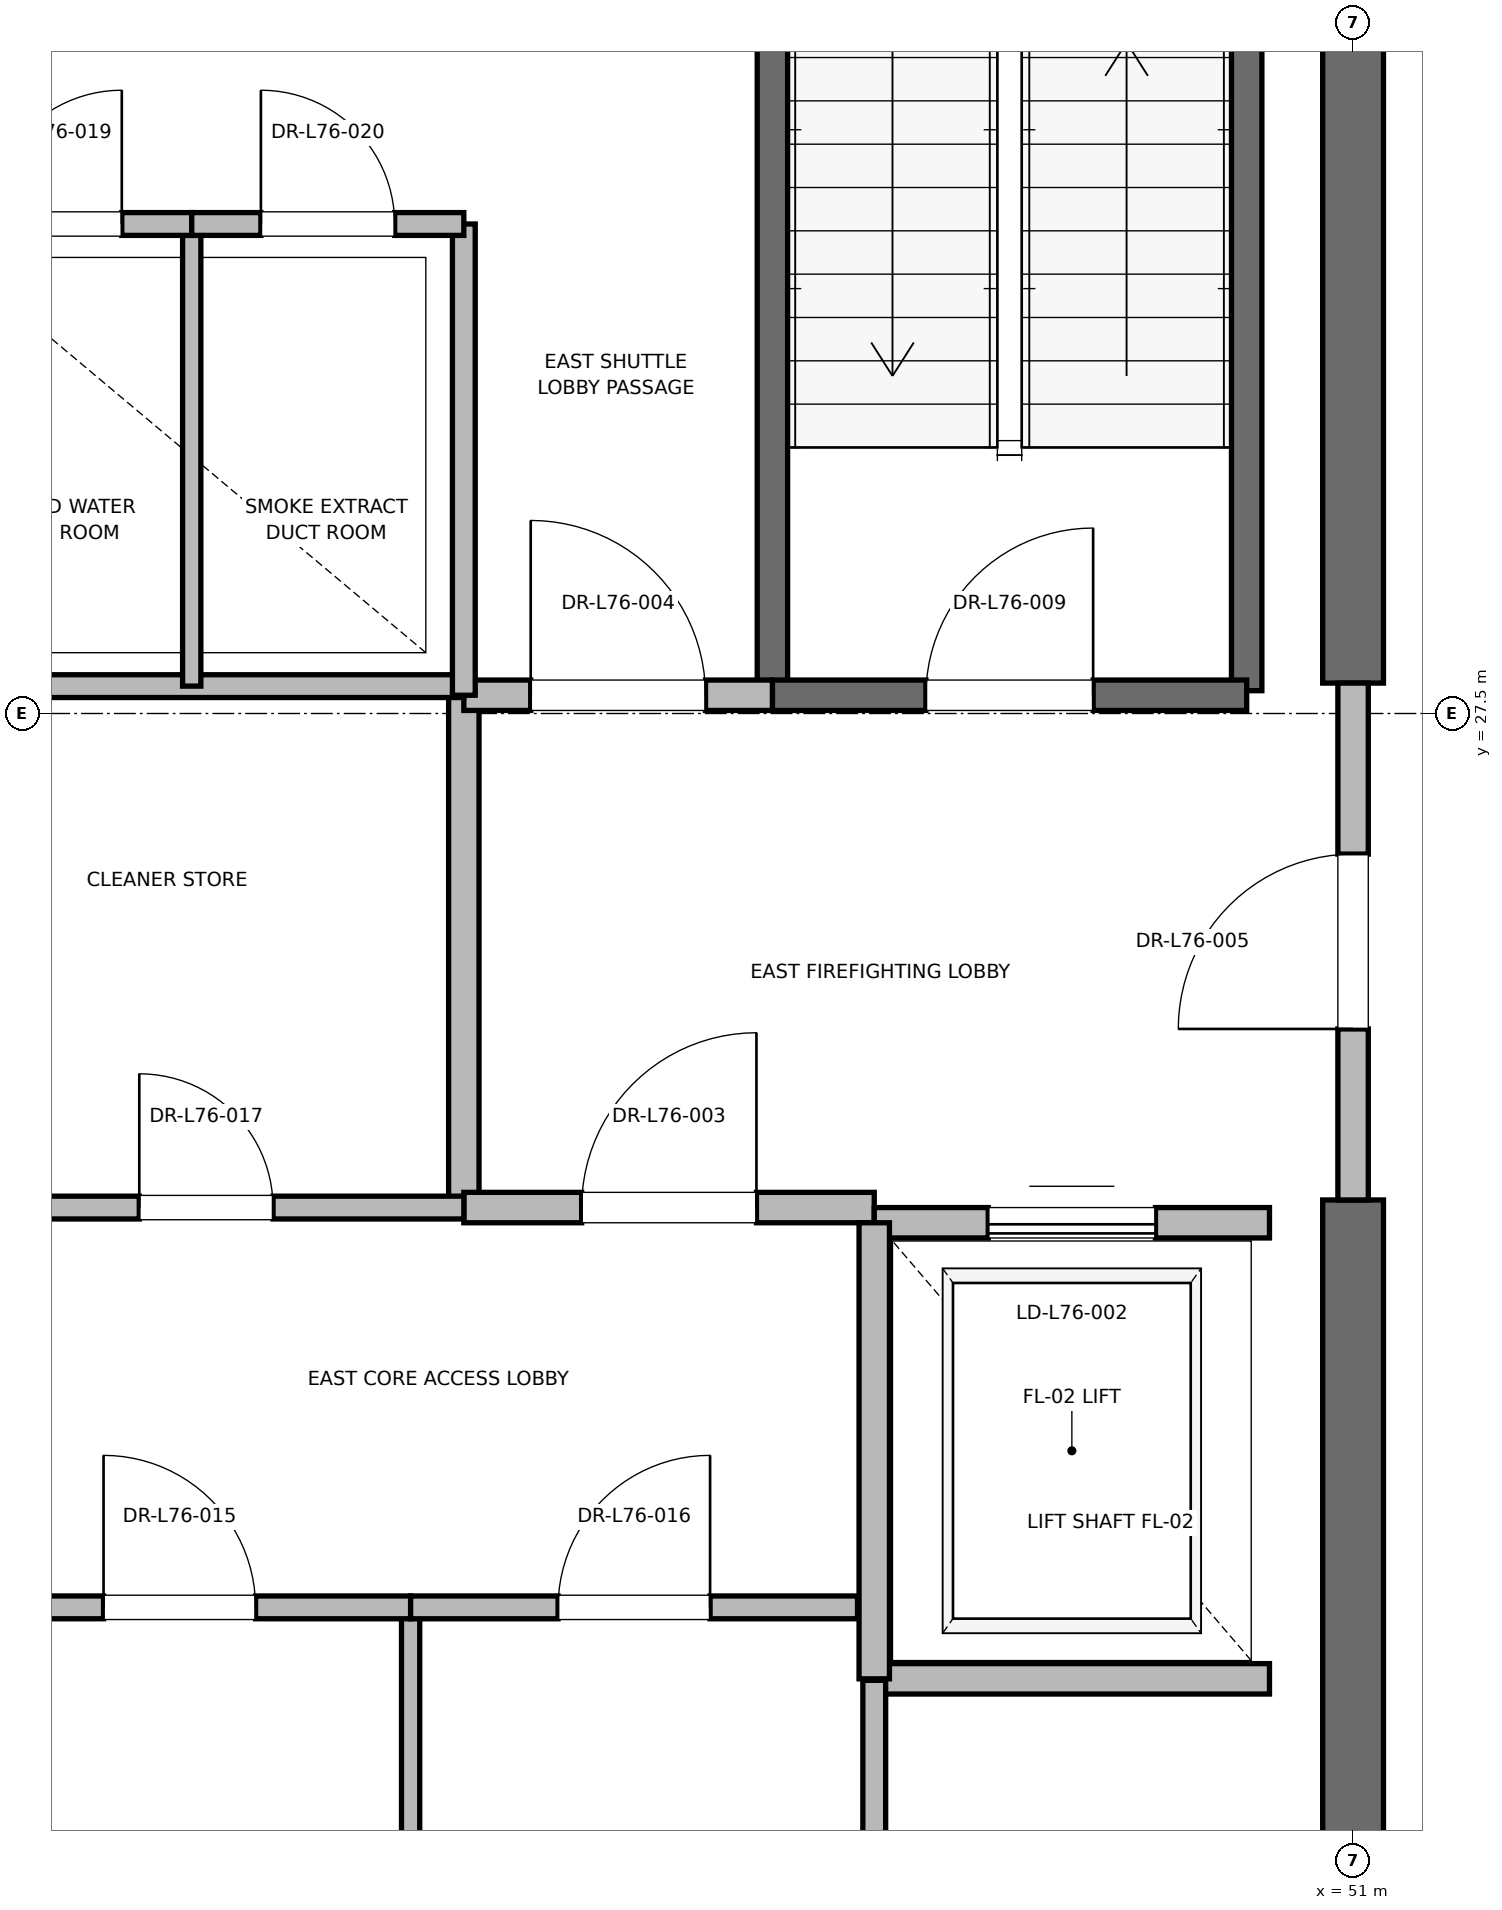
"""IFC4 building model, lengths in metres.
Left out: names, types, materials, properties, quantities, classifications, styles, units other than length and angle.
Written with IfcOpenShell. Run it as: python <this file> out.ifc"""

import sys

from ifc_helpers import new_model, si_unit, direction, frame, frame_2d, origin, place, context, subcontext, project, spatial, rectangle, extrude, element, fill, save


model = new_model("IFC4")
c1 = context("Model", 3, precision=1e-05, world=origin(), true_north=direction((0.0, 1.0)))
c2 = subcontext(c1, "Body", "Model", "MODEL_VIEW")
j1 = project(units=[si_unit("LENGTHUNIT", "METRE"), si_unit("PLANEANGLEUNIT", "RADIAN")], contexts=[c1])
p1 = place(None, origin())
s1 = spatial("IfcSite", under=j1, at=p1, CompositionType="ELEMENT")
p2 = place(p1, origin())
s2 = spatial("IfcBuilding", under=s1, at=p2, CompositionType="ELEMENT")
p3 = place(p2, frame((0.0, 0.0, 326.8)))
s3 = spatial("IfcBuildingStorey", under=s2, at=p3, CompositionType="ELEMENT", Elevation=326.8)
p4 = place(p3, frame((51.0, 18.5, 0.0), z_axis=(0.0, 0.0, 1.0), x_axis=(0.0, 1.0, 0.0)))
e1 = element("IfcWall", 1, at=p4, inside=s3, PredefinedType="SHEAR", context=c2, shape_type="SweptSolid", body=[
    extrude(rectangle(XDim=5.8, YDim=0.4, at=frame_2d((2.9, 0.0))), origin(), (0.0, 0.0, 1.0), 3.785),
])
p5 = place(p3, frame((51.0, 27.7, 0.0), z_axis=(0.0, 0.0, 1.0), x_axis=(0.0, 1.0, 0.0)))
e2 = element("IfcWall", 2, at=p5, inside=s3, PredefinedType="SHEAR", context=c2, shape_type="SweptSolid", body=[
    extrude(rectangle(XDim=8.8, YDim=0.4, at=frame_2d((4.4, 0.0))), origin(), (0.0, 0.0, 1.0), 3.785),
])
p6 = place(p3, frame((50.3, 27.65, 0.0), z_axis=(0.0, 0.0, 1.0), x_axis=(0.0, 1.0, 0.0)))
e3 = element("IfcWall", 3, at=p6, inside=s3, PredefinedType="SOLIDWALL", context=c2, shape_type="SweptSolid", body=[
    extrude(rectangle(XDim=8.15, YDim=0.2, at=frame_2d((4.075, 0.0))), origin(), (0.0, 0.0, 1.0), 3.785),
])
p7 = place(p3, frame((47.18, 27.62, 0.0), z_axis=(0.0, 0.0, 1.0), x_axis=(0.0, 1.0, 0.0)))
e4 = element("IfcWall", 4, at=p7, inside=s3, PredefinedType="SOLIDWALL", context=c2, shape_type="SweptSolid", body=[
    extrude(rectangle(XDim=8.18, YDim=0.2, at=frame_2d((4.09, 0.0))), origin(), (0.0, 0.0, 1.0), 3.785),
])
p8 = place(p3, frame((47.18, 27.62, 0.0), z_axis=(0.0, 0.0, 1.0), x_axis=(1.0, 0.0, 0.0)))
e5 = element("IfcWall", 5, at=p8, inside=s3, PredefinedType="SOLIDWALL", context=c2, shape_type="SweptSolid", body=[
    extrude(rectangle(XDim=3.12, YDim=0.2, at=frame_2d((1.56, 0.0))), origin(), (0.0, 0.0, 1.0), 3.785),
])
p9 = place(p8, frame((1.01, 0.0, 0.0)))
e6 = element("IfcOpeningElement", 6, at=p9, cuts=e5, PredefinedType="OPENING", context=c2, shape_type="SweptSolid", body=[
    extrude(rectangle(XDim=1.1, YDim=2.15, at=frame_2d((0.55, 1.075))), frame((0.0, 0.1, 0.0), z_axis=(0.0, -1.0, 0.0), x_axis=(1.0, 0.0, 0.0)), (0.0, 0.0, 1.0), 0.2),
])
p10 = place(p3, frame((45.15, 24.25, 0.0), z_axis=(0.0, 0.0, 1.0), x_axis=(0.0, 1.0, 0.0)))
e7 = element("IfcWall", 7, at=p10, inside=s3, PredefinedType="PARTITIONING", context=c2, shape_type="SweptSolid", body=[
    extrude(rectangle(XDim=3.37, YDim=0.2, at=frame_2d((1.685, 0.0))), origin(), (0.0, 0.0, 1.0), 3.785),
])
p11 = place(p3, frame((45.15, 24.25, 0.0), z_axis=(0.0, 0.0, 1.0), x_axis=(1.0, 0.0, 0.0)))
e8 = element("IfcWall", 8, at=p11, inside=s3, PredefinedType="PARTITIONING", context=c2, shape_type="SweptSolid", body=[
    extrude(rectangle(XDim=2.7, YDim=0.2, at=frame_2d((1.35, 0.0))), origin(), (0.0, 0.0, 1.0), 3.785),
])
p12 = place(p11, frame((0.775, 0.0, 0.0)))
e9 = element("IfcOpeningElement", 9, at=p12, cuts=e8, PredefinedType="OPENING", context=c2, shape_type="SweptSolid", body=[
    extrude(rectangle(XDim=1.15, YDim=2.2, at=frame_2d((0.575, 1.1))), frame((0.0, 0.1, 0.0), z_axis=(0.0, -1.0, 0.0), x_axis=(1.0, 0.0, 0.0)), (0.0, 0.0, 1.0), 0.2),
])
p13 = place(p3, frame((45.15, 27.62, 0.0), z_axis=(0.0, 0.0, 1.0), x_axis=(1.0, 0.0, 0.0)))
e10 = element("IfcWall", 10, at=p13, inside=s3, PredefinedType="PARTITIONING", context=c2, shape_type="SweptSolid", body=[
    extrude(rectangle(XDim=2.03, YDim=0.2, at=frame_2d((1.015, 0.0))), origin(), (0.0, 0.0, 1.0), 3.785),
])
p14 = place(p13, frame((0.44, 0.0, 0.0)))
e11 = element("IfcOpeningElement", 11, at=p14, cuts=e10, PredefinedType="OPENING", context=c2, shape_type="SweptSolid", body=[
    extrude(rectangle(XDim=1.15, YDim=2.2, at=frame_2d((0.575, 1.1))), frame((0.0, 0.1, 0.0), z_axis=(0.0, -1.0, 0.0), x_axis=(1.0, 0.0, 0.0)), (0.0, 0.0, 1.0), 0.2),
])
p15 = place(p3, frame((51.0, 24.3, 0.0), z_axis=(0.0, 0.0, 1.0), x_axis=(0.0, 1.0, 0.0)))
e12 = element("IfcWall", 12, at=p15, inside=s3, PredefinedType="PARTITIONING", context=c2, shape_type="SweptSolid", body=[
    extrude(rectangle(XDim=3.4, YDim=0.2, at=frame_2d((1.7, 0.0))), origin(), (0.0, 0.0, 1.0), 2.865),
])
p16 = place(p15, frame((1.125, 0.0, 0.0)))
e13 = element("IfcOpeningElement", 13, at=p16, cuts=e12, PredefinedType="OPENING", context=c2, shape_type="SweptSolid", body=[
    extrude(rectangle(XDim=1.15, YDim=2.2, at=frame_2d((0.575, 1.1))), frame((0.0, 0.1, 0.0), z_axis=(0.0, -1.0, 0.0), x_axis=(1.0, 0.0, 0.0)), (0.0, 0.0, 1.0), 0.2),
])
p17 = place(p3, frame((47.85, 21.15, 0.0), z_axis=(0.0, 0.0, 1.0), x_axis=(1.0, 0.0, 0.0)))
e14 = element("IfcWall", 14, at=p17, inside=s3, PredefinedType="SOLIDWALL", context=c2, shape_type="SweptSolid", body=[
    extrude(rectangle(XDim=2.6, YDim=0.2, at=frame_2d((1.3, 0.0))), origin(), (0.0, 0.0, 1.0), 3.785),
])
p18 = place(p3, frame((50.45, 24.15, 0.0), z_axis=(0.0, 0.0, 1.0), x_axis=(-1.0, 0.0, 0.0)))
e15 = element("IfcWall", 15, at=p18, inside=s3, PredefinedType="SOLIDWALL", context=c2, shape_type="SweptSolid", body=[
    extrude(rectangle(XDim=2.6, YDim=0.2, at=frame_2d((1.3, 0.0))), origin(), (0.0, 0.0, 1.0), 2.865),
])
p19 = place(p18, frame((0.75, 0.0, 0.0)))
e16 = element("IfcOpeningElement", 16, at=p19, cuts=e15, PredefinedType="OPENING", context=c2, shape_type="SweptSolid", body=[
    extrude(rectangle(XDim=1.1, YDim=2.2, at=frame_2d((0.55, 1.1))), frame((0.0, 0.1, 0.0), z_axis=(0.0, -1.0, 0.0), x_axis=(1.0, 0.0, 0.0)), (0.0, 0.0, 1.0), 0.2),
])
p20 = place(p3, frame((47.85, 24.15, 0.0), z_axis=(0.0, 0.0, 1.0), x_axis=(0.0, -1.0, 0.0)))
e17 = element("IfcWall", 17, at=p20, inside=s3, PredefinedType="SOLIDWALL", context=c2, shape_type="SweptSolid", body=[
    extrude(rectangle(XDim=3.0, YDim=0.2, at=frame_2d((1.5, 0.0))), origin(), (0.0, 0.0, 1.0), 3.785),
])
p21 = place(p3, frame((41.56, 27.68, 0.0), z_axis=(0.0, 0.0, 1.0), x_axis=(1.0, 0.0, 0.0)))
e18 = element("IfcWall", 18, at=p21, inside=s3, PredefinedType="PARTITIONING", context=c2, shape_type="SweptSolid", body=[
    extrude(rectangle(XDim=3.59, YDim=0.15, at=frame_2d((1.795, 0.0))), origin(), (0.0, 0.0, 1.0), 2.85),
])
p22 = place(p3, frame((47.85, 18.6, 0.0), z_axis=(0.0, 0.0, 1.0), x_axis=(0.0, 1.0, 0.0)))
e19 = element("IfcWall", 19, at=p22, inside=s3, PredefinedType="PARTITIONING", context=c2, shape_type="SweptSolid", body=[
    extrude(rectangle(XDim=2.54, YDim=0.15, at=frame_2d((1.27, 0.0))), origin(), (0.0, 0.0, 1.0), 2.85),
])
p23 = place(p3, frame((44.8, 18.6, 0.0), z_axis=(0.0, 0.0, 1.0), x_axis=(0.0, 1.0, 0.0)))
e20 = element("IfcWall", 20, at=p23, inside=s3, PredefinedType="PARTITIONING", context=c2, shape_type="SweptSolid", body=[
    extrude(rectangle(XDim=3.02, YDim=0.12, at=frame_2d((1.51, 0.0))), origin(), (0.0, 0.0, 1.0), 2.85),
])
p24 = place(p3, frame((41.76, 21.62, 0.0), z_axis=(0.0, 0.0, 1.0), x_axis=(1.0, 0.0, 0.0)))
e21 = element("IfcWall", 21, at=p24, inside=s3, PredefinedType="PARTITIONING", context=c2, shape_type="SweptSolid", body=[
    extrude(rectangle(XDim=3.04, YDim=0.15, at=frame_2d((1.52, 0.0))), origin(), (0.0, 0.0, 1.0), 2.85),
])
p25 = place(p24, frame((1.02, 0.0, 0.0)))
e22 = element("IfcOpeningElement", 22, at=p25, cuts=e21, PredefinedType="OPENING", context=c2, shape_type="SweptSolid", body=[
    extrude(rectangle(XDim=1.0, YDim=2.15, at=frame_2d((0.5, 1.075))), frame((0.0, 0.075, 0.0), z_axis=(0.0, -1.0, 0.0), x_axis=(1.0, 0.0, 0.0)), (0.0, 0.0, 1.0), 0.15),
])
p26 = place(p3, frame((44.8, 21.62, 0.0), z_axis=(0.0, 0.0, 1.0), x_axis=(1.0, 0.0, 0.0)))
e23 = element("IfcWall", 23, at=p26, inside=s3, PredefinedType="PARTITIONING", context=c2, shape_type="SweptSolid", body=[
    extrude(rectangle(XDim=2.94, YDim=0.15, at=frame_2d((1.47, 0.0))), origin(), (0.0, 0.0, 1.0), 2.85),
])
p27 = place(p26, frame((0.97, 0.0, 0.0)))
e24 = element("IfcOpeningElement", 24, at=p27, cuts=e23, PredefinedType="OPENING", context=c2, shape_type="SweptSolid", body=[
    extrude(rectangle(XDim=1.0, YDim=2.15, at=frame_2d((0.5, 1.075))), frame((0.0, 0.075, 0.0), z_axis=(0.0, -1.0, 0.0), x_axis=(1.0, 0.0, 0.0)), (0.0, 0.0, 1.0), 0.15),
])
p28 = place(p3, frame((41.76, 24.25, 0.0), z_axis=(0.0, 0.0, 1.0), x_axis=(1.0, 0.0, 0.0)))
e25 = element("IfcWall", 25, at=p28, inside=s3, PredefinedType="PARTITIONING", context=c2, shape_type="SweptSolid", body=[
    extrude(rectangle(XDim=3.39, YDim=0.15, at=frame_2d((1.695, 0.0))), origin(), (0.0, 0.0, 1.0), 2.85),
])
p29 = place(p28, frame((1.255, 0.0, 0.0)))
e26 = element("IfcOpeningElement", 26, at=p29, cuts=e25, PredefinedType="OPENING", context=c2, shape_type="SweptSolid", body=[
    extrude(rectangle(XDim=0.88, YDim=2.1, at=frame_2d((0.44, 1.05))), frame((0.0, 0.075, 0.0), z_axis=(0.0, -1.0, 0.0), x_axis=(1.0, 0.0, 0.0)), (0.0, 0.0, 1.0), 0.15),
])
p30 = place(p3, frame((45.15, 27.62, 0.0), z_axis=(0.0, 0.0, 1.0), x_axis=(0.0, 1.0, 0.0)))
e27 = element("IfcWall", 27, at=p30, inside=s3, PredefinedType="PARTITIONING", context=c2, shape_type="SweptSolid", body=[
    extrude(rectangle(XDim=3.1, YDim=0.15, at=frame_2d((1.55, 0.0))), origin(), (0.0, 0.0, 1.0), 2.85),
])
p31 = place(p3, frame((43.36, 27.68, 0.0), z_axis=(0.0, 0.0, 1.0), x_axis=(0.0, 1.0, 0.0)))
e28 = element("IfcWall", 28, at=p31, inside=s3, PredefinedType="PARTITIONING", context=c2, shape_type="SweptSolid", body=[
    extrude(rectangle(XDim=3.04, YDim=0.12, at=frame_2d((1.52, 0.0))), origin(), (0.0, 0.0, 1.0), 2.85),
])
p32 = place(p3, frame((41.56, 30.72, 0.0), z_axis=(0.0, 0.0, 1.0), x_axis=(1.0, 0.0, 0.0)))
e29 = element("IfcWall", 29, at=p32, inside=s3, PredefinedType="PARTITIONING", context=c2, shape_type="SweptSolid", body=[
    extrude(rectangle(XDim=1.8, YDim=0.15, at=frame_2d((0.9, 0.0))), origin(), (0.0, 0.0, 1.0), 2.85),
])
p33 = place(p32, frame((0.46, 0.0, 0.0)))
e30 = element("IfcOpeningElement", 30, at=p33, cuts=e29, PredefinedType="OPENING", context=c2, shape_type="SweptSolid", body=[
    extrude(rectangle(XDim=0.88, YDim=2.1, at=frame_2d((0.44, 1.05))), frame((0.0, 0.075, 0.0), z_axis=(0.0, -1.0, 0.0), x_axis=(1.0, 0.0, 0.0)), (0.0, 0.0, 1.0), 0.15),
])
p34 = place(p3, frame((43.36, 30.72, 0.0), z_axis=(0.0, 0.0, 1.0), x_axis=(1.0, 0.0, 0.0)))
e31 = element("IfcWall", 31, at=p34, inside=s3, PredefinedType="PARTITIONING", context=c2, shape_type="SweptSolid", body=[
    extrude(rectangle(XDim=1.79, YDim=0.15, at=frame_2d((0.895, 0.0))), origin(), (0.0, 0.0, 1.0), 2.85),
])
p35 = place(p34, frame((0.455, 0.0, 0.0)))
e32 = element("IfcOpeningElement", 32, at=p35, cuts=e31, PredefinedType="OPENING", context=c2, shape_type="SweptSolid", body=[
    extrude(rectangle(XDim=0.88, YDim=2.1, at=frame_2d((0.44, 1.05))), frame((0.0, 0.075, 0.0), z_axis=(0.0, -1.0, 0.0), x_axis=(1.0, 0.0, 0.0)), (0.0, 0.0, 1.0), 0.15),
])
p36 = place(p9, origin())
e33 = element("IfcDoor", 33, at=p36, inside=s3, OperationType="SINGLE_SWING_RIGHT", PredefinedType="DOOR", context=c2, shape_type="SweptSolid", body=[
    extrude(rectangle(XDim=1.1, YDim=2.15, at=frame_2d((0.55, 1.075))), frame((0.0, 0.025, 0.0), z_axis=(0.0, -1.0, 0.0), x_axis=(1.0, 0.0, 0.0)), (0.0, 0.0, 1.0), 0.05),
])
fill(e6, e33)
p37 = place(p12, origin())
e34 = element("IfcDoor", 34, at=p37, inside=s3, OperationType="SINGLE_SWING_RIGHT", PredefinedType="DOOR", context=c2, shape_type="SweptSolid", body=[
    extrude(rectangle(XDim=1.15, YDim=2.2, at=frame_2d((0.575, 1.1))), frame((0.0, 0.025, 0.0), z_axis=(0.0, -1.0, 0.0), x_axis=(1.0, 0.0, 0.0)), (0.0, 0.0, 1.0), 0.05),
])
fill(e9, e34)
p38 = place(p14, origin())
e35 = element("IfcDoor", 35, at=p38, inside=s3, OperationType="SINGLE_SWING_LEFT", PredefinedType="DOOR", context=c2, shape_type="SweptSolid", body=[
    extrude(rectangle(XDim=1.15, YDim=2.2, at=frame_2d((0.575, 1.1))), frame((0.0, 0.025, 0.0), z_axis=(0.0, -1.0, 0.0), x_axis=(1.0, 0.0, 0.0)), (0.0, 0.0, 1.0), 0.05),
])
fill(e11, e35)
p39 = place(p16, origin())
e36 = element("IfcDoor", 36, at=p39, inside=s3, OperationType="SINGLE_SWING_LEFT", PredefinedType="DOOR", context=c2, shape_type="SweptSolid", body=[
    extrude(rectangle(XDim=1.15, YDim=2.2, at=frame_2d((0.575, 1.1))), frame((0.0, 0.025, 0.0), z_axis=(0.0, -1.0, 0.0), x_axis=(1.0, 0.0, 0.0)), (0.0, 0.0, 1.0), 0.05),
])
fill(e13, e36)
p40 = place(p19, origin())
e37 = element("IfcDoor", 37, at=p40, inside=s3, OperationType="SLIDING_TO_RIGHT", PredefinedType="DOOR", context=c2, shape_type="SweptSolid", body=[
    extrude(rectangle(XDim=1.1, YDim=2.2, at=frame_2d((0.55, 1.1))), frame((0.0, 0.025, 0.0), z_axis=(0.0, -1.0, 0.0), x_axis=(1.0, 0.0, 0.0)), (0.0, 0.0, 1.0), 0.05),
])
fill(e16, e37)
p41 = place(p25, origin())
e38 = element("IfcDoor", 38, at=p41, inside=s3, OperationType="SINGLE_SWING_LEFT", PredefinedType="DOOR", context=c2, shape_type="SweptSolid", body=[
    extrude(rectangle(XDim=1.0, YDim=2.15, at=frame_2d((0.5, 1.075))), frame((0.0, 0.025, 0.0), z_axis=(0.0, -1.0, 0.0), x_axis=(1.0, 0.0, 0.0)), (0.0, 0.0, 1.0), 0.05),
])
fill(e22, e38)
p42 = place(p27, origin())
e39 = element("IfcDoor", 39, at=p42, inside=s3, OperationType="SINGLE_SWING_RIGHT", PredefinedType="DOOR", context=c2, shape_type="SweptSolid", body=[
    extrude(rectangle(XDim=1.0, YDim=2.15, at=frame_2d((0.5, 1.075))), frame((0.0, 0.025, 0.0), z_axis=(0.0, -1.0, 0.0), x_axis=(1.0, 0.0, 0.0)), (0.0, 0.0, 1.0), 0.05),
])
fill(e24, e39)
p43 = place(p29, origin())
e40 = element("IfcDoor", 40, at=p43, inside=s3, OperationType="SINGLE_SWING_LEFT", PredefinedType="DOOR", context=c2, shape_type="SweptSolid", body=[
    extrude(rectangle(XDim=0.88, YDim=2.1, at=frame_2d((0.44, 1.05))), frame((0.0, 0.025, 0.0), z_axis=(0.0, -1.0, 0.0), x_axis=(1.0, 0.0, 0.0)), (0.0, 0.0, 1.0), 0.05),
])
fill(e26, e40)
p44 = place(p33, origin())
e41 = element("IfcDoor", 41, at=p44, inside=s3, OperationType="SINGLE_SWING_RIGHT", PredefinedType="DOOR", context=c2, shape_type="SweptSolid", body=[
    extrude(rectangle(XDim=0.88, YDim=2.1, at=frame_2d((0.44, 1.05))), frame((0.0, 0.025, 0.0), z_axis=(0.0, -1.0, 0.0), x_axis=(1.0, 0.0, 0.0)), (0.0, 0.0, 1.0), 0.05),
])
fill(e30, e41)
p45 = place(p35, origin())
e42 = element("IfcDoor", 42, at=p45, inside=s3, OperationType="SINGLE_SWING_LEFT", PredefinedType="DOOR", context=c2, shape_type="SweptSolid", body=[
    extrude(rectangle(XDim=0.88, YDim=2.1, at=frame_2d((0.44, 1.05))), frame((0.0, 0.025, 0.0), z_axis=(0.0, -1.0, 0.0), x_axis=(1.0, 0.0, 0.0)), (0.0, 0.0, 1.0), 0.05),
])
fill(e32, e42)
save(model, sys.argv[1])
